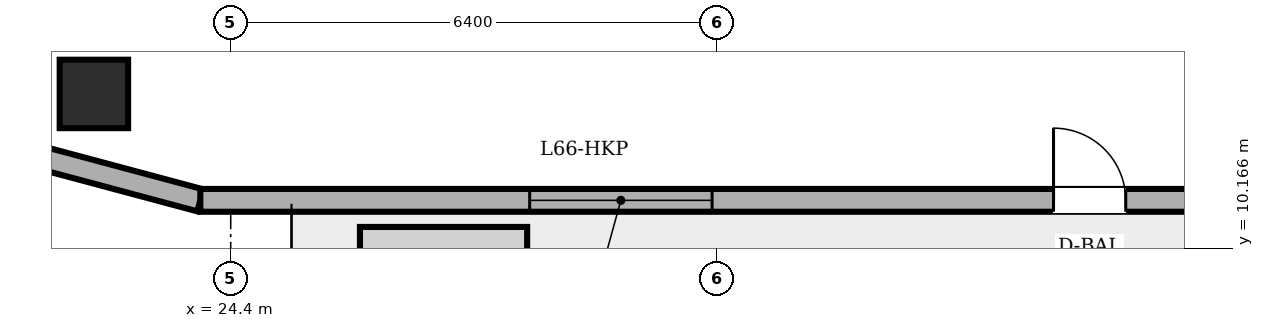
"""IFC4 building model, lengths in metres.
Left out: names, types, materials, properties, quantities, classifications, styles, units other than length and angle.
Written with IfcOpenShell. Run it as: python <this file> out.ifc"""

import sys

from ifc_helpers import new_model, si_unit, direction, frame, frame_2d, origin, origin_2d, place, context, subcontext, project, spatial, rectangle, circle, extrude, element, fill, save


model = new_model("IFC4")
c1 = context("Model", 3, precision=1e-05, world=origin(), true_north=direction((0.0, 1.0)))
c2 = subcontext(c1, "Body", "Model", "MODEL_VIEW")
j1 = project(units=[si_unit("LENGTHUNIT", "METRE"), si_unit("PLANEANGLEUNIT", "RADIAN")], contexts=[c1])
p1 = place(None, origin())
s1 = spatial("IfcSite", under=j1, at=p1, CompositionType="ELEMENT")
p2 = place(p1, origin())
s2 = spatial("IfcBuilding", under=s1, at=p2, CompositionType="ELEMENT")
p3 = place(p2, frame((0.0, 0.0, 253.7)))
s3 = spatial("IfcBuildingStorey", under=s2, at=p3, CompositionType="ELEMENT", Elevation=253.7)
p4 = place(p3, frame((22.6, 12.2, 0.0), z_axis=(0.0, 0.0, 1.0), x_axis=(1.0, 0.0, 0.0)))
e1 = element("IfcColumn", 1, at=p4, inside=s3, PredefinedType="COLUMN", context=c2, shape_type="SweptSolid", body=[
    extrude(circle(Radius=0.45, at=origin_2d()), origin(), (0.0, 0.0, 1.0), 5.1),
])
p5 = place(p3, frame((21.7, 11.416, 0.0), z_axis=(0.0, 0.0, 1.0), x_axis=(0.965960405575, -0.25868995895, 0.0)))
e2 = element("IfcWall", 2, at=p5, inside=s3, PredefinedType="SOLIDWALL", context=c2, shape_type="SweptSolid", body=[
    extrude(rectangle(XDim=2.381, YDim=0.3, at=frame_2d((1.19, 0.0))), origin(), (0.0, 0.0, 1.0), 4.9),
])
p6 = place(p3, frame((24.0, 10.8, 0.0), z_axis=(0.0, 0.0, 1.0), x_axis=(1.0, 0.0, 0.0)))
e3 = element("IfcWall", 3, at=p6, inside=s3, PredefinedType="SOLIDWALL", context=c2, shape_type="SweptSolid", body=[
    extrude(rectangle(XDim=37.03, YDim=0.3, at=frame_2d((18.515, 0.0))), origin(), (0.0, 0.0, 1.0), 4.9),
])
p7 = place(p6, frame((11.225, 0.0, 0.0)))
e4 = element("IfcOpeningElement", 4, at=p7, cuts=e3, PredefinedType="OPENING", context=c2, shape_type="SweptSolid", body=[
    extrude(rectangle(XDim=0.95, YDim=2.2, at=frame_2d((0.475, 1.1))), frame((0.0, 0.16, 0.0), z_axis=(0.0, -1.0, 0.0), x_axis=(1.0, 0.0, 0.0)), (0.0, 0.0, 1.0), 0.32),
])
p8 = place(p6, frame((4.333, 0.0, 0.85)))
e5 = element("IfcOpeningElement", 5, at=p8, cuts=e3, PredefinedType="OPENING", context=c2, shape_type="SweptSolid", body=[
    extrude(rectangle(XDim=2.4, YDim=2.1, at=frame_2d((1.2, 1.05))), frame((0.0, 0.16, 0.0), z_axis=(0.0, -1.0, 0.0), x_axis=(1.0, 0.0, 0.0)), (0.0, 0.0, 1.0), 0.32),
])
p9 = place(p6, frame((19.133, 0.0, 0.85)))
e6 = element("IfcOpeningElement", 6, at=p9, cuts=e3, PredefinedType="OPENING", context=c2, shape_type="SweptSolid", body=[
    extrude(rectangle(XDim=2.4, YDim=2.1, at=frame_2d((1.2, 1.05))), frame((0.0, 0.16, 0.0), z_axis=(0.0, -1.0, 0.0), x_axis=(1.0, 0.0, 0.0)), (0.0, 0.0, 1.0), 0.32),
])
p10 = place(p6, frame((23.567, 0.0, 0.85)))
e7 = element("IfcOpeningElement", 7, at=p10, cuts=e3, PredefinedType="OPENING", context=c2, shape_type="SweptSolid", body=[
    extrude(rectangle(XDim=2.4, YDim=2.1, at=frame_2d((1.2, 1.05))), frame((0.0, 0.16, 0.0), z_axis=(0.0, -1.0, 0.0), x_axis=(1.0, 0.0, 0.0)), (0.0, 0.0, 1.0), 0.32),
])
p11 = place(p6, frame((30.493, 0.0, 0.85)))
e8 = element("IfcOpeningElement", 8, at=p11, cuts=e3, PredefinedType="OPENING", context=c2, shape_type="SweptSolid", body=[
    extrude(rectangle(XDim=2.4, YDim=2.1, at=frame_2d((1.2, 1.05))), frame((0.0, 0.16, 0.0), z_axis=(0.0, -1.0, 0.0), x_axis=(1.0, 0.0, 0.0)), (0.0, 0.0, 1.0), 0.32),
])
p12 = place(p6, frame((32.987, 0.0, 0.85)))
e9 = element("IfcOpeningElement", 9, at=p12, cuts=e3, PredefinedType="OPENING", context=c2, shape_type="SweptSolid", body=[
    extrude(rectangle(XDim=2.4, YDim=2.1, at=frame_2d((1.2, 1.05))), frame((0.0, 0.16, 0.0), z_axis=(0.0, -1.0, 0.0), x_axis=(1.0, 0.0, 0.0)), (0.0, 0.0, 1.0), 0.32),
])
p13 = place(p7, origin())
e10 = element("IfcDoor", 10, at=p13, inside=s3, OperationType="SINGLE_SWING_LEFT", PredefinedType="DOOR", context=c2, shape_type="SweptSolid", body=[
    extrude(rectangle(XDim=0.95, YDim=2.2, at=frame_2d((0.475, 1.1))), frame((0.0, 0.025, 0.0), z_axis=(0.0, -1.0, 0.0), x_axis=(1.0, 0.0, 0.0)), (0.0, 0.0, 1.0), 0.05),
])
fill(e4, e10)
p14 = place(p8, origin())
e11 = element("IfcWindow", 11, at=p14, inside=s3, PartitioningType="TRIPLE_PANEL_VERTICAL", PredefinedType="WINDOW", context=c2, shape_type="SweptSolid", body=[
    extrude(rectangle(XDim=2.4, YDim=2.1, at=frame_2d((1.2, 1.05))), frame((0.0, 0.03, 0.0), z_axis=(0.0, -1.0, 0.0), x_axis=(1.0, 0.0, 0.0)), (0.0, 0.0, 1.0), 0.06),
])
fill(e5, e11)
save(model, sys.argv[1])
